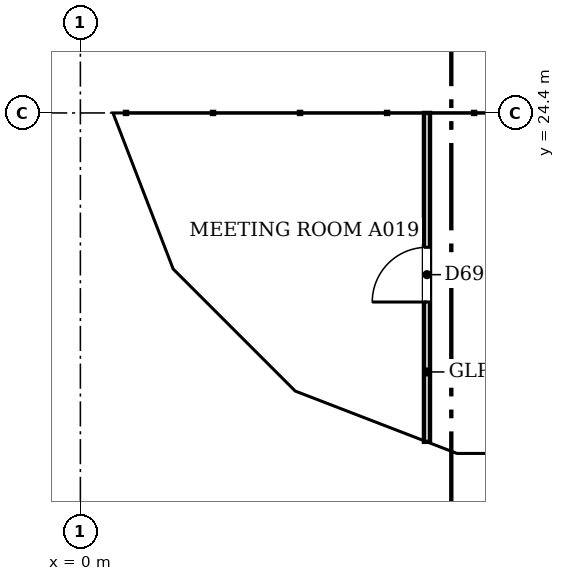
"""IFC4 building model, lengths in metres.
Left out: names, types, materials, properties, quantities, classifications, styles, units other than length and angle.
Written with IfcOpenShell. Run it as: python <this file> out.ifc"""

import sys

from ifc_helpers import new_model, si_unit, direction, frame, frame_2d, origin, place, context, subcontext, project, spatial, polyline, rectangle, outline, extrude, faceted_brep, source, transform, mapped, element, fill, save


model = new_model("IFC4")
c1 = context("Model", 3, precision=1e-05, world=origin(), true_north=direction((0.0, 1.0)))
c2 = subcontext(c1, "Body", "Model", "MODEL_VIEW")
j1 = project(units=[si_unit("LENGTHUNIT", "METRE"), si_unit("PLANEANGLEUNIT", "RADIAN")], contexts=[c1])
p1 = place(None, origin())
s1 = spatial("IfcSite", under=j1, at=p1, CompositionType="ELEMENT")
p2 = place(p1, origin())
s2 = spatial("IfcBuilding", under=s1, at=p2, CompositionType="ELEMENT")
p3 = place(p2, frame((0.0, 0.0, 102.8)))
s3 = spatial("IfcBuildingStorey", under=s2, at=p3, CompositionType="ELEMENT", Elevation=102.8)
m1 = source(origin(), c2, "Body", "Brep", [
    faceted_brep([(3.003, -0.25, 0.0), (3.05, -0.25, 0.06), (3.05, -0.25, 7.54), (3.003, -0.25, 7.6), (0.0, -0.25, 3.8), (0.0, 0.25, 3.8), (2.957, 0.25, 7.541), (2.957, 0.25, 0.059), (3.003, 0.0, 0.0), (3.003, 0.0, 7.6)], [[[0, 1, 2, 3, 4]], [[5, 6, 7]], [[1, 0, 8]], [[9, 3, 2]], [[6, 5, 4, 3, 9]], [[5, 7, 8, 0, 4]], [[1, 8, 7, 6, 9, 2]]]),
])
p4 = place(p3, frame((0.25, 27.45, -3.8), z_axis=(0.0, 0.0, 1.0), x_axis=(0.0, -1.0, 0.0)))
e1 = element("IfcWall", 1, at=p4, inside=s3, PredefinedType="SOLIDWALL", context=c2, shape_type="MappedRepresentation", body=[
    mapped(m1, transform((0.0, 0.0, 0.0), scale=1.0)),
])
m2 = source(origin(), c2, "Body", "SweptSolid", [
    extrude(outline(polyline([(2.803, 6.944), (0.319, 3.8), (2.803, 0.656), (2.803, 6.944)])), frame((0.0, 0.26, 0.0), z_axis=(0.0, -1.0, 0.0), x_axis=(1.0, 0.0, 0.0)), (0.0, 0.0, 1.0), 0.52),
])
p5 = place(p4, origin())
e2 = element("IfcOpeningElement", 2, at=p5, cuts=e1, PredefinedType="OPENING", context=c2, shape_type="MappedRepresentation", body=[
    mapped(m2, transform((0.0, 0.0, 0.0), scale=1.0)),
])
m3 = source(origin(), c2, "Body", "Brep", [
    faceted_brep([(0.047, -0.25, 0.0), (2.997, -0.25, 3.8), (0.047, -0.25, 7.6), (0.0, -0.25, 7.541), (0.0, -0.25, 0.059), (0.093, 0.25, 7.54), (2.944, 0.25, 3.868), (2.944, 0.25, 3.732), (0.093, 0.25, 0.06), (2.997, 0.0, 3.8), (0.047, 0.0, 0.0), (0.047, 0.0, 7.6)], [[[0, 1, 2, 3, 4]], [[5, 6, 7, 8]], [[8, 7, 9, 1, 0, 10]], [[6, 5, 11, 2, 1, 9]], [[3, 2, 11]], [[10, 0, 4]], [[8, 10, 4, 3, 11, 5]], [[9, 7, 6]]]),
])
p6 = place(p3, frame((0.233, 24.49, -3.8), z_axis=(0.0, 0.0, 1.0), x_axis=(0.359901446078, -0.932990326376, 0.0)))
e3 = element("IfcWall", 3, at=p6, inside=s3, PredefinedType="SOLIDWALL", context=c2, shape_type="MappedRepresentation", body=[
    mapped(m3, transform((0.0, 0.0, 0.0), scale=1.0)),
])
m4 = source(origin(), c2, "Body", "SweptSolid", [
    extrude(outline(polyline([(0.247, 0.665), (2.681, 3.8), (0.247, 6.935), (0.247, 0.665)])), frame((0.0, 0.26, 0.0), z_axis=(0.0, -1.0, 0.0), x_axis=(1.0, 0.0, 0.0)), (0.0, 0.0, 1.0), 0.52),
])
p7 = place(p6, origin())
e4 = element("IfcOpeningElement", 4, at=p7, cuts=e3, PredefinedType="OPENING", context=c2, shape_type="MappedRepresentation", body=[
    mapped(m4, transform((0.0, 0.0, 0.0), scale=1.0)),
])
m5 = source(origin(), c2, "Body", "Brep", [
    faceted_brep([(2.944, -0.25, 0.0), (2.997, -0.25, 0.068), (2.997, -0.25, 7.532), (2.944, -0.25, 7.6), (0.0, -0.25, 3.8), (0.053, 0.25, 3.868), (2.891, 0.25, 7.532), (2.891, 0.25, 0.068), (0.053, 0.25, 3.732), (2.944, 0.0, 0.0), (2.944, 0.0, 7.6), (0.0, 0.0, 3.8)], [[[0, 1, 2, 3, 4]], [[5, 6, 7, 8]], [[1, 0, 9]], [[10, 3, 2]], [[6, 5, 11, 4, 3, 10]], [[8, 7, 9, 0, 4, 11]], [[8, 11, 5]], [[1, 9, 7, 6, 10, 2]]]),
])
p8 = place(p3, frame((1.312, 21.694, -3.8), z_axis=(0.0, 0.0, 1.0), x_axis=(0.707066050402, -0.707147509625, 0.0)))
e5 = element("IfcWall", 5, at=p8, inside=s3, PredefinedType="SOLIDWALL", context=c2, shape_type="MappedRepresentation", body=[
    mapped(m5, transform((0.0, 0.0, 0.0), scale=1.0)),
])
m6 = source(origin(), c2, "Body", "SweptSolid", [
    extrude(outline(polyline([(2.744, 6.934), (0.316, 3.8), (2.744, 0.666), (2.744, 6.934)])), frame((0.0, 0.26, 0.0), z_axis=(0.0, -1.0, 0.0), x_axis=(1.0, 0.0, 0.0)), (0.0, 0.0, 1.0), 0.52),
])
p9 = place(p8, origin())
e6 = element("IfcOpeningElement", 6, at=p9, cuts=e5, PredefinedType="OPENING", context=c2, shape_type="MappedRepresentation", body=[
    mapped(m6, transform((0.0, 0.0, 0.0), scale=1.0)),
])
m7 = source(origin(), c2, "Body", "Brep", [
    faceted_brep([(0.053, -0.25, 0.0), (3.003, -0.25, 3.8), (0.053, -0.25, 7.6), (0.0, -0.25, 7.532), (0.0, -0.25, 0.068), (0.106, 0.25, 7.532), (2.957, 0.25, 3.86), (2.957, 0.25, 3.74), (0.106, 0.25, 0.068), (3.003, 0.0, 3.8), (0.053, 0.0, 0.0), (0.053, 0.0, 7.6)], [[[0, 1, 2, 3, 4]], [[5, 6, 7, 8]], [[8, 7, 9, 1, 0, 10]], [[6, 5, 11, 2, 1, 9]], [[3, 2, 11]], [[10, 0, 4]], [[8, 10, 4, 3, 11, 5]], [[9, 7, 6]]]),
])
p10 = place(p3, frame((3.344, 19.631, -3.8), z_axis=(0.0, 0.0, 1.0), x_axis=(0.933007896601, -0.359855894603, 0.0)))
e7 = element("IfcWall", 7, at=p10, inside=s3, PredefinedType="SOLIDWALL", context=c2, shape_type="MappedRepresentation", body=[
    mapped(m7, transform((0.0, 0.0, 0.0), scale=1.0)),
])
m8 = source(origin(), c2, "Body", "SweptSolid", [
    extrude(outline(polyline([(0.253, 0.665), (2.687, 3.8), (0.253, 6.935), (0.253, 0.665)])), frame((0.0, 0.26, 0.0), z_axis=(0.0, -1.0, 0.0), x_axis=(1.0, 0.0, 0.0)), (0.0, 0.0, 1.0), 0.52),
])
p11 = place(p10, origin())
e8 = element("IfcOpeningElement", 8, at=p11, cuts=e7, PredefinedType="OPENING", context=c2, shape_type="MappedRepresentation", body=[
    mapped(m8, transform((0.0, 0.0, 0.0), scale=1.0)),
])
m9 = source(origin(), c2, "Body", "Brep", [
    faceted_brep([(3.003, -0.25, 0.0), (6.053, -0.25, 3.8), (3.003, -0.25, 7.6), (0.0, -0.25, 3.8), (0.047, 0.25, 3.859), (3.003, 0.25, 7.6), (6.053, 0.25, 3.8), (3.003, 0.25, 0.0), (0.047, 0.25, 3.741), (0.0, 0.0, 3.8)], [[[0, 1, 2, 3]], [[4, 5, 6, 7, 8]], [[7, 6, 1, 0]], [[6, 5, 2, 1]], [[5, 4, 9, 3, 2]], [[8, 7, 0, 3, 9]], [[8, 9, 4]]]),
])
p12 = place(p3, frame((6.146, 18.55, -3.8), z_axis=(0.0, 0.0, 1.0), x_axis=(1.0, 0.0, 0.0)))
e9 = element("IfcWall", 9, at=p12, inside=s3, PredefinedType="SOLIDWALL", context=c2, shape_type="MappedRepresentation", body=[
    mapped(m9, transform((0.0, 0.0, 0.0), scale=1.0)),
])
m10 = source(origin(), c2, "Body", "SweptSolid", [
    extrude(outline(polyline([(3.005, 0.401), (5.733, 3.8), (3.005, 7.199), (0.319, 3.8), (3.005, 0.401)])), frame((0.0, 0.26, 0.0), z_axis=(0.0, -1.0, 0.0), x_axis=(1.0, 0.0, 0.0)), (0.0, 0.0, 1.0), 0.52),
])
p13 = place(p12, origin())
e10 = element("IfcOpeningElement", 10, at=p13, cuts=e9, PredefinedType="OPENING", context=c2, shape_type="MappedRepresentation", body=[
    mapped(m10, transform((0.0, 0.0, 0.0), scale=1.0)),
])
m11 = source(origin(), c2, "Body", "Brep", [
    faceted_brep([(3.05, -0.25, 0.0), (6.053, -0.25, 3.8), (0.0, -0.25, 3.8), (0.0, 0.25, 3.8), (6.007, 0.25, 3.8), (6.007, 0.25, 3.741), (3.05, 0.25, 0.0), (6.053, 0.0, 3.8)], [[[0, 1, 2]], [[3, 4, 5, 6]], [[6, 5, 7, 1, 0]], [[4, 3, 2, 1, 7]], [[3, 6, 0, 2]], [[5, 4, 7]]]),
])
p14 = place(p3, frame((0.25, 30.5, 0.0), z_axis=(0.0, 0.0, 1.0), x_axis=(0.0, -1.0, 0.0)))
e11 = element("IfcWall", 11, at=p14, inside=s3, PredefinedType="SOLIDWALL", context=c2, shape_type="MappedRepresentation", body=[
    mapped(m11, transform((0.0, 0.0, 0.0), scale=1.0)),
])
m12 = source(origin(), c2, "Body", "SweptSolid", [
    extrude(outline(polyline([(3.049, 0.401), (5.537, 3.55), (0.521, 3.55), (3.049, 0.401)])), frame((0.0, 0.26, 0.0), z_axis=(0.0, -1.0, 0.0), x_axis=(1.0, 0.0, 0.0)), (0.0, 0.0, 1.0), 0.52),
])
p15 = place(p14, origin())
e12 = element("IfcOpeningElement", 12, at=p15, cuts=e11, PredefinedType="OPENING", context=c2, shape_type="MappedRepresentation", body=[
    mapped(m12, transform((0.0, 0.0, 0.0), scale=1.0)),
])
m13 = source(origin(), c2, "Body", "Brep", [
    faceted_brep([(2.95, -0.25, 0.0), (3.003, -0.25, 0.068), (3.003, -0.25, 3.8), (0.0, -0.25, 3.8), (0.047, 0.25, 3.8), (2.898, 0.25, 3.8), (2.898, 0.25, 0.068), (0.047, 0.25, 3.74), (2.95, 0.0, 0.0), (0.0, 0.0, 3.8)], [[[0, 1, 2, 3]], [[4, 5, 6, 7]], [[1, 0, 8]], [[5, 4, 9, 3, 2]], [[7, 6, 8, 0, 3, 9]], [[7, 9, 4]], [[1, 8, 6, 5, 2]]]),
])
p16 = place(p3, frame((0.25, 24.447, 0.0), z_axis=(0.0, 0.0, 1.0), x_axis=(0.35992665181, -0.932980602862, 0.0)))
e13 = element("IfcWall", 13, at=p16, inside=s3, PredefinedType="SOLIDWALL", context=c2, shape_type="MappedRepresentation", body=[
    mapped(m13, transform((0.0, 0.0, 0.0), scale=1.0)),
])
m14 = source(origin(), c2, "Body", "SweptSolid", [
    extrude(outline(polyline([(2.75, 3.55), (0.511, 3.55), (2.75, 0.665), (2.75, 3.55)])), frame((0.0, 0.26, 0.0), z_axis=(0.0, -1.0, 0.0), x_axis=(1.0, 0.0, 0.0)), (0.0, 0.0, 1.0), 0.52),
])
p17 = place(p16, origin())
e14 = element("IfcOpeningElement", 14, at=p17, cuts=e13, PredefinedType="OPENING", context=c2, shape_type="MappedRepresentation", body=[
    mapped(m14, transform((0.0, 0.0, 0.0), scale=1.0)),
])
m15 = source(origin(), c2, "Body", "Brep", [
    faceted_brep([(0.053, -0.25, 0.0), (2.997, -0.25, 3.8), (0.0, -0.25, 3.8), (0.0, -0.25, 0.068), (0.106, 0.25, 3.8), (2.944, 0.25, 3.8), (2.944, 0.25, 3.732), (0.106, 0.25, 0.068), (2.997, 0.0, 3.8), (0.053, 0.0, 0.0)], [[[0, 1, 2, 3]], [[4, 5, 6, 7]], [[7, 6, 8, 1, 0, 9]], [[5, 4, 2, 1, 8]], [[9, 0, 3]], [[7, 9, 3, 2, 4]], [[6, 5, 8]]]),
])
p18 = place(p3, frame((1.274, 21.731, 0.0), z_axis=(0.0, 0.0, 1.0), x_axis=(0.707147509625, -0.707066050402, 0.0)))
e15 = element("IfcWall", 15, at=p18, inside=s3, PredefinedType="SOLIDWALL", context=c2, shape_type="MappedRepresentation", body=[
    mapped(m15, transform((0.0, 0.0, 0.0), scale=1.0)),
])
m16 = source(origin(), c2, "Body", "SweptSolid", [
    extrude(outline(polyline([(0.253, 0.666), (2.487, 3.55), (0.253, 3.55), (0.253, 0.666)])), frame((0.0, 0.26, 0.0), z_axis=(0.0, -1.0, 0.0), x_axis=(1.0, 0.0, 0.0)), (0.0, 0.0, 1.0), 0.52),
])
p19 = place(p18, origin())
e16 = element("IfcOpeningElement", 16, at=p19, cuts=e15, PredefinedType="OPENING", context=c2, shape_type="MappedRepresentation", body=[
    mapped(m16, transform((0.0, 0.0, 0.0), scale=1.0)),
])
m17 = source(origin(), c2, "Body", "Brep", [
    faceted_brep([(2.95, -0.25, 0.0), (2.997, -0.25, 0.059), (2.997, -0.25, 3.8), (0.0, -0.25, 3.8), (0.053, 0.25, 3.8), (2.904, 0.25, 3.8), (2.904, 0.25, 0.06), (0.053, 0.25, 3.732), (2.95, 0.0, 0.0), (0.0, 0.0, 3.8)], [[[0, 1, 2, 3]], [[4, 5, 6, 7]], [[1, 0, 8]], [[5, 4, 9, 3, 2]], [[7, 6, 8, 0, 3, 9]], [[7, 9, 4]], [[1, 8, 6, 5, 2]]]),
])
p20 = place(p3, frame((3.394, 19.612, 0.0), z_axis=(0.0, 0.0, 1.0), x_axis=(0.932990326376, -0.359901446078, 0.0)))
e17 = element("IfcWall", 17, at=p20, inside=s3, PredefinedType="SOLIDWALL", context=c2, shape_type="MappedRepresentation", body=[
    mapped(m17, transform((0.0, 0.0, 0.0), scale=1.0)),
])
p21 = place(p20, origin())
e18 = element("IfcOpeningElement", 18, at=p21, cuts=e17, PredefinedType="OPENING", context=c2, shape_type="MappedRepresentation", body=[
    mapped(m14, transform((0.0, 0.0, 0.0), scale=1.0)),
])
m18 = source(origin(), c2, "Body", "Brep", [
    faceted_brep([(0.047, -0.25, 0.0), (3.05, -0.25, 3.8), (0.0, -0.25, 3.8), (0.0, -0.25, 0.06), (0.093, 0.25, 3.8), (3.05, 0.25, 3.8), (0.093, 0.25, 0.059), (0.047, 0.0, 0.0)], [[[0, 1, 2, 3]], [[4, 5, 6]], [[6, 5, 1, 0, 7]], [[5, 4, 2, 1]], [[7, 0, 3]], [[6, 7, 3, 2, 4]]]),
])
p22 = place(p3, frame((6.1, 18.55, 0.0), z_axis=(0.0, 0.0, 1.0), x_axis=(1.0, 0.0, 0.0)))
e19 = element("IfcWall", 19, at=p22, inside=s3, PredefinedType="SOLIDWALL", context=c2, shape_type="MappedRepresentation", body=[
    mapped(m18, transform((0.0, 0.0, 0.0), scale=1.0)),
])
m19 = source(origin(), c2, "Body", "SweptSolid", [
    extrude(outline(polyline([(0.247, 0.656), (2.534, 3.55), (0.247, 3.55), (0.247, 0.656)])), frame((0.0, 0.26, 0.0), z_axis=(0.0, -1.0, 0.0), x_axis=(1.0, 0.0, 0.0)), (0.0, 0.0, 1.0), 0.52),
])
p23 = place(p22, origin())
e20 = element("IfcOpeningElement", 20, at=p23, cuts=e19, PredefinedType="OPENING", context=c2, shape_type="MappedRepresentation", body=[
    mapped(m19, transform((0.0, 0.0, 0.0), scale=1.0)),
])
p24 = place(p3, frame((5.7, 18.99, 0.0), z_axis=(0.0, 0.0, 1.0), x_axis=(0.0, 1.0, 0.0)))
e21 = element("IfcWall", 21, at=p24, inside=s3, PredefinedType="PARTITIONING", context=c2, shape_type="SweptSolid", body=[
    extrude(rectangle(XDim=5.41, YDim=0.1, at=frame_2d((2.705, 0.0))), origin(), (0.0, 0.0, 1.0), 2.715),
])
m20 = source(origin(), c2, "Body", "SweptSolid", [
    extrude(rectangle(XDim=0.9, YDim=2.1, at=frame_2d((0.45, 1.05))), frame((0.0, 0.06, 0.0), z_axis=(0.0, -1.0, 0.0), x_axis=(1.0, 0.0, 0.0)), (0.0, 0.0, 1.0), 0.12),
])
p25 = place(p24, frame((2.3, 0.0, 0.0)))
e22 = element("IfcOpeningElement", 22, at=p25, cuts=e21, PredefinedType="OPENING", context=c2, shape_type="MappedRepresentation", body=[
    mapped(m20, transform((0.0, 0.0, 0.0), scale=1.0)),
])
m21 = source(origin(), c2, "Body", "SweptSolid", [
    extrude(rectangle(XDim=0.9, YDim=2.1, at=frame_2d((0.45, 1.05))), frame((0.0, 0.025, 0.0), z_axis=(0.0, -1.0, 0.0), x_axis=(1.0, 0.0, 0.0)), (0.0, 0.0, 1.0), 0.05),
])
p26 = place(p25, origin())
e23 = element("IfcDoor", 23, at=p26, inside=s3, OperationType="SINGLE_SWING_LEFT", PredefinedType="DOOR", context=c2, shape_type="MappedRepresentation", body=[
    mapped(m21, transform((0.0, 0.0, 0.0), scale=1.0)),
])
fill(e22, e23)
save(model, sys.argv[1])
